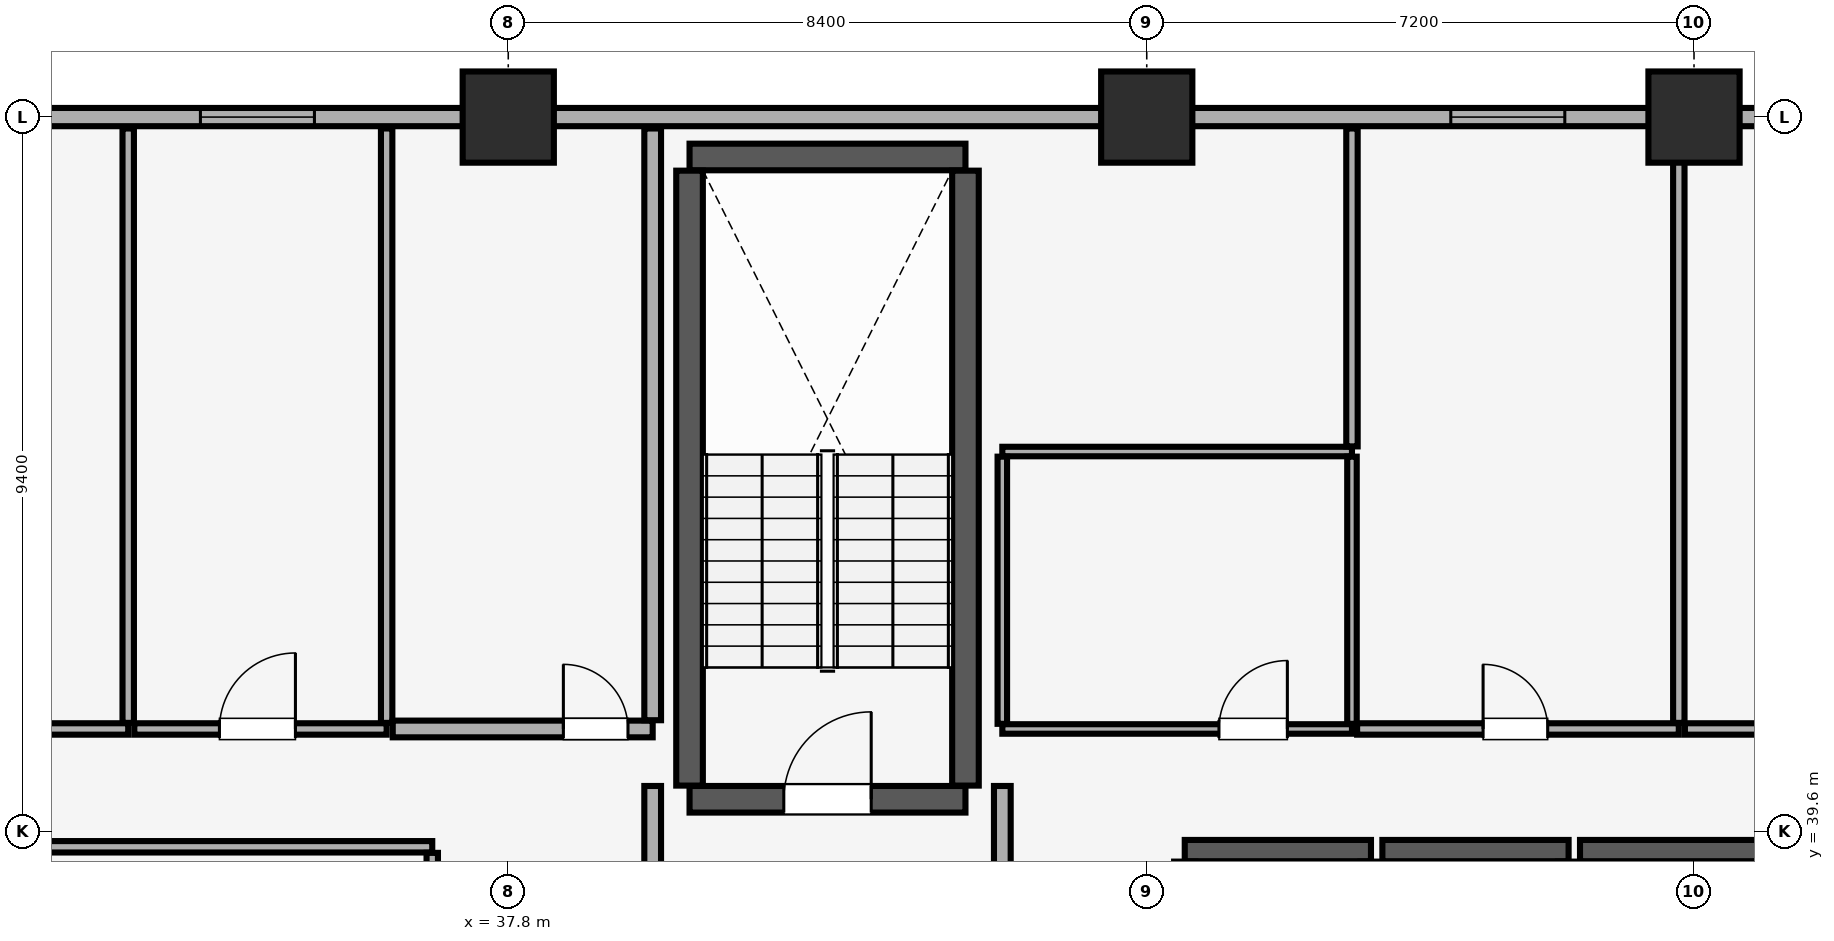
"""IFC4 building model, lengths in metres.
Left out: names, types, materials, properties, quantities, classifications, styles, units other than length and angle.
Written with IfcOpenShell. Run it as: python <this file> out.ifc"""

import sys

from ifc_helpers import new_model, si_unit, direction, frame, frame_2d, origin, origin_2d, place, context, subcontext, project, spatial, rectangle, extrude, element, fill, save


model = new_model("IFC4")
c1 = context("Model", 3, precision=1e-05, world=origin(), true_north=direction((0.0, 1.0)))
c2 = subcontext(c1, "Body", "Model", "MODEL_VIEW")
j1 = project(units=[si_unit("LENGTHUNIT", "METRE"), si_unit("PLANEANGLEUNIT", "RADIAN")], contexts=[c1])
p1 = place(None, origin())
s1 = spatial("IfcSite", under=j1, at=p1, CompositionType="ELEMENT")
p2 = place(p1, origin())
s2 = spatial("IfcBuilding", under=s1, at=p2, CompositionType="ELEMENT")
p3 = place(p2, frame((0.0, 0.0, 135.35)))
s3 = spatial("IfcBuildingStorey", under=s2, at=p3, CompositionType="ELEMENT", Elevation=135.35)
for number, where, z_axis, x_axis in (
    (1, (37.8, 49.0, 0.0), (0.0, 0.0, 1.0), (1.0, 0.0, 0.0)),
    (2, (46.2, 49.0, 0.0), (0.0, 0.0, 1.0), (1.0, 0.0, 0.0)),
    (3, (53.4, 49.0, 0.0), (0.0, 0.0, 1.0), (1.0, 0.0, 0.0)),
):
    element("IfcColumn", number, at=place(p3, frame(where, z_axis=z_axis, x_axis=x_axis)), inside=s3, PredefinedType="COLUMN", context=c2, shape_type="SweptSolid", body=[
        extrude(rectangle(XDim=1.2, YDim=1.2, at=origin_2d()), origin(), (0.0, 0.0, 1.0), 3.56),
    ])
p4 = place(p3, frame((77.0, 49.0, 0.0), z_axis=(0.0, 0.0, 1.0), x_axis=(-1.0, 0.0, 0.0)))
e4 = element("IfcWall", 4, at=p4, inside=s3, PredefinedType="SOLIDWALL", context=c2, shape_type="SweptSolid", body=[
    extrude(rectangle(XDim=70.0, YDim=0.24, at=frame_2d((35.0, 0.0))), origin(), (0.0, 0.0, 1.0), 2.61),
])
p5 = place(p4, frame((63.7, 0.0, 0.85)))
e5 = element("IfcOpeningElement", 5, at=p5, cuts=e4, PredefinedType="OPENING", context=c2, shape_type="SweptSolid", body=[
    extrude(rectangle(XDim=3.0, YDim=1.5, at=frame_2d((1.5, 0.75))), frame((0.0, 0.13, 0.0), z_axis=(0.0, -1.0, 0.0), x_axis=(1.0, 0.0, 0.0)), (0.0, 0.0, 1.0), 0.26),
])
p6 = place(p4, frame((3.3, 0.0, 0.85)))
e6 = element("IfcOpeningElement", 6, at=p6, cuts=e4, PredefinedType="OPENING", context=c2, shape_type="SweptSolid", body=[
    extrude(rectangle(XDim=3.0, YDim=1.5, at=frame_2d((1.5, 0.75))), frame((0.0, 0.13, 0.0), z_axis=(0.0, -1.0, 0.0), x_axis=(1.0, 0.0, 0.0)), (0.0, 0.0, 1.0), 0.26),
])
p7 = place(p4, frame((48.565, 0.0, 0.9)))
e7 = element("IfcOpeningElement", 7, at=p7, cuts=e4, PredefinedType="OPENING", context=c2, shape_type="SweptSolid", body=[
    extrude(rectangle(XDim=1.5, YDim=1.4, at=frame_2d((0.75, 0.7))), frame((0.0, 0.13, 0.0), z_axis=(0.0, -1.0, 0.0), x_axis=(1.0, 0.0, 0.0)), (0.0, 0.0, 1.0), 0.26),
])
p8 = place(p4, frame((41.75, 0.0, 0.9)))
e8 = element("IfcOpeningElement", 8, at=p8, cuts=e4, PredefinedType="OPENING", context=c2, shape_type="SweptSolid", body=[
    extrude(rectangle(XDim=1.5, YDim=1.4, at=frame_2d((0.75, 0.7))), frame((0.0, 0.13, 0.0), z_axis=(0.0, -1.0, 0.0), x_axis=(1.0, 0.0, 0.0)), (0.0, 0.0, 1.0), 0.26),
])
p9 = place(p4, frame((25.3, 0.0, 0.9)))
e9 = element("IfcOpeningElement", 9, at=p9, cuts=e4, PredefinedType="OPENING", context=c2, shape_type="SweptSolid", body=[
    extrude(rectangle(XDim=1.5, YDim=1.4, at=frame_2d((0.75, 0.7))), frame((0.0, 0.13, 0.0), z_axis=(0.0, -1.0, 0.0), x_axis=(1.0, 0.0, 0.0)), (0.0, 0.0, 1.0), 0.26),
])
p10 = place(p4, frame((20.685, 0.0, 0.9)))
e10 = element("IfcOpeningElement", 10, at=p10, cuts=e4, PredefinedType="OPENING", context=c2, shape_type="SweptSolid", body=[
    extrude(rectangle(XDim=1.5, YDim=1.4, at=frame_2d((0.75, 0.7))), frame((0.0, 0.13, 0.0), z_axis=(0.0, -1.0, 0.0), x_axis=(1.0, 0.0, 0.0)), (0.0, 0.0, 1.0), 0.26),
])
p11 = place(p3, frame((40.185, 40.025, 0.0), z_axis=(0.0, 0.0, 1.0), x_axis=(1.0, 0.0, 0.0)))
e11 = element("IfcWall", 11, at=p11, inside=s3, PredefinedType="SHEAR", context=c2, shape_type="SweptSolid", body=[
    extrude(rectangle(XDim=3.63, YDim=0.35, at=frame_2d((1.815, 0.0))), origin(), (0.0, 0.0, 1.0), 3.56),
])
p12 = place(p11, frame((1.24, 0.0, 0.0)))
e12 = element("IfcOpeningElement", 12, at=p12, cuts=e11, PredefinedType="OPENING", context=c2, shape_type="SweptSolid", body=[
    extrude(rectangle(XDim=1.15, YDim=2.15, at=frame_2d((0.575, 1.075))), frame((0.0, 0.185, 0.0), z_axis=(0.0, -1.0, 0.0), x_axis=(1.0, 0.0, 0.0)), (0.0, 0.0, 1.0), 0.37),
])
p13 = place(p3, frame((40.185, 48.475, 0.0), z_axis=(0.0, 0.0, 1.0), x_axis=(1.0, 0.0, 0.0)))
e13 = element("IfcWall", 13, at=p13, inside=s3, PredefinedType="SHEAR", context=c2, shape_type="SweptSolid", body=[
    extrude(rectangle(XDim=3.63, YDim=0.35, at=frame_2d((1.815, 0.0))), origin(), (0.0, 0.0, 1.0), 3.56),
])
for number, where, z_axis, x_axis in (
    (14, (40.185, 40.205, 0.0), (0.0, 0.0, 1.0), (0.0, 1.0, 0.0)),
    (15, (43.815, 40.205, 0.0), (0.0, 0.0, 1.0), (0.0, 1.0, 0.0)),
):
    element("IfcWall", number, at=place(p3, frame(where, z_axis=z_axis, x_axis=x_axis)), inside=s3, PredefinedType="SHEAR", context=c2, shape_type="SweptSolid", body=[
        extrude(rectangle(XDim=8.09, YDim=0.35, at=frame_2d((4.045, 0.0))), origin(), (0.0, 0.0, 1.0), 3.56),
    ])
p14 = place(p3, frame((46.7, 39.35, 0.0), z_axis=(0.0, 0.0, 1.0), x_axis=(1.0, 0.0, 0.0)))
e16 = element("IfcWall", 16, at=p14, inside=s3, PredefinedType="SHEAR", context=c2, shape_type="SweptSolid", body=[
    extrude(rectangle(XDim=2.45, YDim=0.28, at=frame_2d((1.225, 0.0))), origin(), (0.0, 0.0, 1.0), 3.56),
])
for number, where, z_axis, x_axis in (
    (17, (46.7, 37.145, 0.0), (0.0, 0.0, 1.0), (0.0, 1.0, 0.0)),
    (18, (49.15, 37.145, 0.0), (0.0, 0.0, 1.0), (0.0, 1.0, 0.0)),
):
    element("IfcWall", number, at=place(p3, frame(where, z_axis=z_axis, x_axis=x_axis)), inside=s3, PredefinedType="SHEAR", context=c2, shape_type="SweptSolid", body=[
        extrude(rectangle(XDim=2.06, YDim=0.28, at=frame_2d((1.03, 0.0))), origin(), (0.0, 0.0, 1.0), 3.56),
    ])
p15 = place(p3, frame((49.3, 39.35, 0.0), z_axis=(0.0, 0.0, 1.0), x_axis=(1.0, 0.0, 0.0)))
e19 = element("IfcWall", 19, at=p15, inside=s3, PredefinedType="SHEAR", context=c2, shape_type="SweptSolid", body=[
    extrude(rectangle(XDim=2.45, YDim=0.28, at=frame_2d((1.225, 0.0))), origin(), (0.0, 0.0, 1.0), 3.56),
])
p16 = place(p3, frame((51.75, 37.145, 0.0), z_axis=(0.0, 0.0, 1.0), x_axis=(0.0, 1.0, 0.0)))
e20 = element("IfcWall", 20, at=p16, inside=s3, PredefinedType="SHEAR", context=c2, shape_type="SweptSolid", body=[
    extrude(rectangle(XDim=2.06, YDim=0.28, at=frame_2d((1.03, 0.0))), origin(), (0.0, 0.0, 1.0), 3.56),
])
p17 = place(p3, frame((51.9, 39.35, 0.0), z_axis=(0.0, 0.0, 1.0), x_axis=(1.0, 0.0, 0.0)))
e21 = element("IfcWall", 21, at=p17, inside=s3, PredefinedType="SHEAR", context=c2, shape_type="SweptSolid", body=[
    extrude(rectangle(XDim=2.59, YDim=0.28, at=frame_2d((1.295, 0.0))), origin(), (0.0, 0.0, 1.0), 3.56),
])
for number, where, z_axis, x_axis in (
    (22, (39.7, 34.415, 0.0), (0.0, 0.0, 1.0), (0.0, 1.0, 0.0)),
    (23, (44.3, 34.415, 0.0), (0.0, 0.0, 1.0), (0.0, 1.0, 0.0)),
):
    element("IfcWall", number, at=place(p3, frame(where, z_axis=z_axis, x_axis=x_axis)), inside=s3, PredefinedType="PARTITIONING", context=c2, shape_type="SweptSolid", body=[
        extrude(rectangle(XDim=5.785, YDim=0.22, at=frame_2d((2.893, 0.0))), origin(), (0.0, 0.0, 1.0), 3.56),
    ])
p18 = place(p3, frame((31.6, 39.4, 0.0), z_axis=(0.0, 0.0, 1.0), x_axis=(1.0, 0.0, 0.0)))
e24 = element("IfcWall", 24, at=p18, inside=s3, PredefinedType="PARTITIONING", context=c2, shape_type="SweptSolid", body=[
    extrude(rectangle(XDim=5.2, YDim=0.15, at=frame_2d((2.6, 0.0))), origin(), (0.0, 0.0, 1.0), 3.56),
])
p19 = place(p3, frame((36.8, 34.38, 0.0), z_axis=(0.0, 0.0, 1.0), x_axis=(0.0, 1.0, 0.0)))
e25 = element("IfcWall", 25, at=p19, inside=s3, PredefinedType="PARTITIONING", context=c2, shape_type="SweptSolid", body=[
    extrude(rectangle(XDim=4.94, YDim=0.15, at=frame_2d((2.47, 0.0))), origin(), (0.0, 0.0, 1.0), 3.56),
])
p20 = place(p3, frame((25.0, 40.95, 0.0), z_axis=(0.0, 0.0, 1.0), x_axis=(1.0, 0.0, 0.0)))
e26 = element("IfcWall", 26, at=p20, inside=s3, PredefinedType="PARTITIONING", context=c2, shape_type="SweptSolid", body=[
    extrude(rectangle(XDim=7.8, YDim=0.15, at=frame_2d((3.9, 0.0))), origin(), (0.0, 0.0, 1.0), 3.56),
])
p21 = place(p20, frame((3.475, 0.0, 0.0)))
e27 = element("IfcOpeningElement", 27, at=p21, cuts=e26, PredefinedType="OPENING", context=c2, shape_type="SweptSolid", body=[
    extrude(rectangle(XDim=0.85, YDim=2.1, at=frame_2d((0.425, 1.05))), frame((0.0, 0.085, 0.0), z_axis=(0.0, -1.0, 0.0), x_axis=(1.0, 0.0, 0.0)), (0.0, 0.0, 1.0), 0.17),
])
p22 = place(p3, frame((32.8, 41.03, 0.0), z_axis=(0.0, 0.0, 1.0), x_axis=(0.0, 1.0, 0.0)))
e28 = element("IfcWall", 28, at=p22, inside=s3, PredefinedType="PARTITIONING", context=c2, shape_type="SweptSolid", body=[
    extrude(rectangle(XDim=7.82, YDim=0.15, at=frame_2d((3.91, 0.0))), origin(), (0.0, 0.0, 1.0), 3.56),
])
p23 = place(p3, frame((32.88, 40.95, 0.0), z_axis=(0.0, 0.0, 1.0), x_axis=(1.0, 0.0, 0.0)))
e29 = element("IfcWall", 29, at=p23, inside=s3, PredefinedType="PARTITIONING", context=c2, shape_type="SweptSolid", body=[
    extrude(rectangle(XDim=3.32, YDim=0.15, at=frame_2d((1.66, 0.0))), origin(), (0.0, 0.0, 1.0), 3.56),
])
p24 = place(p23, frame((1.12, 0.0, 0.0)))
e30 = element("IfcOpeningElement", 30, at=p24, cuts=e29, PredefinedType="OPENING", context=c2, shape_type="SweptSolid", body=[
    extrude(rectangle(XDim=1.0, YDim=2.15, at=frame_2d((0.5, 1.075))), frame((0.0, 0.085, 0.0), z_axis=(0.0, -1.0, 0.0), x_axis=(1.0, 0.0, 0.0)), (0.0, 0.0, 1.0), 0.17),
])
p25 = place(p3, frame((36.2, 41.03, 0.0), z_axis=(0.0, 0.0, 1.0), x_axis=(0.0, 1.0, 0.0)))
e31 = element("IfcWall", 31, at=p25, inside=s3, PredefinedType="PARTITIONING", context=c2, shape_type="SweptSolid", body=[
    extrude(rectangle(XDim=7.82, YDim=0.15, at=frame_2d((3.91, 0.0))), origin(), (0.0, 0.0, 1.0), 3.56),
])
p26 = place(p3, frame((36.28, 40.95, 0.0), z_axis=(0.0, 0.0, 1.0), x_axis=(1.0, 0.0, 0.0)))
e32 = element("IfcWall", 32, at=p26, inside=s3, PredefinedType="PARTITIONING", context=c2, shape_type="SweptSolid", body=[
    extrude(rectangle(XDim=3.42, YDim=0.22, at=frame_2d((1.71, 0.0))), origin(), (0.0, 0.0, 1.0), 3.56),
])
p27 = place(p26, frame((2.245, 0.0, 0.0)))
e33 = element("IfcOpeningElement", 33, at=p27, cuts=e32, PredefinedType="OPENING", context=c2, shape_type="SweptSolid", body=[
    extrude(rectangle(XDim=0.85, YDim=2.1, at=frame_2d((0.425, 1.05))), frame((0.0, 0.12, 0.0), z_axis=(0.0, -1.0, 0.0), x_axis=(1.0, 0.0, 0.0)), (0.0, 0.0, 1.0), 0.24),
])
p28 = place(p3, frame((39.7, 41.065, 0.0), z_axis=(0.0, 0.0, 1.0), x_axis=(0.0, 1.0, 0.0)))
e34 = element("IfcWall", 34, at=p28, inside=s3, PredefinedType="PARTITIONING", context=c2, shape_type="SweptSolid", body=[
    extrude(rectangle(XDim=7.785, YDim=0.22, at=frame_2d((3.893, 0.0))), origin(), (0.0, 0.0, 1.0), 3.56),
])
p29 = place(p3, frame((44.3, 40.95, 0.0), z_axis=(0.0, 0.0, 1.0), x_axis=(1.0, 0.0, 0.0)))
e35 = element("IfcWall", 35, at=p29, inside=s3, PredefinedType="PARTITIONING", context=c2, shape_type="SweptSolid", body=[
    extrude(rectangle(XDim=4.6, YDim=0.125, at=frame_2d((2.3, 0.0))), origin(), (0.0, 0.0, 1.0), 3.56),
])
p30 = place(p29, frame((2.85, 0.0, 0.0)))
e36 = element("IfcOpeningElement", 36, at=p30, cuts=e35, PredefinedType="OPENING", context=c2, shape_type="SweptSolid", body=[
    extrude(rectangle(XDim=0.9, YDim=2.1, at=frame_2d((0.45, 1.05))), frame((0.0, 0.073, 0.0), z_axis=(0.0, -1.0, 0.0), x_axis=(1.0, 0.0, 0.0)), (0.0, 0.0, 1.0), 0.145),
])
p31 = place(p3, frame((44.3, 44.6, 0.0), z_axis=(0.0, 0.0, 1.0), x_axis=(1.0, 0.0, 0.0)))
e37 = element("IfcWall", 37, at=p31, inside=s3, PredefinedType="PARTITIONING", context=c2, shape_type="SweptSolid", body=[
    extrude(rectangle(XDim=4.6, YDim=0.125, at=frame_2d((2.3, 0.0))), origin(), (0.0, 0.0, 1.0), 3.56),
])
for number, where, z_axis, x_axis in (
    (38, (44.3, 41.018, 0.0), (0.0, 0.0, 1.0), (0.0, 1.0, 0.0)),
    (39, (48.9, 41.018, 0.0), (0.0, 0.0, 1.0), (0.0, 1.0, 0.0)),
):
    element("IfcWall", number, at=place(p3, frame(where, z_axis=z_axis, x_axis=x_axis)), inside=s3, PredefinedType="PARTITIONING", context=c2, shape_type="SweptSolid", body=[
        extrude(rectangle(XDim=3.515, YDim=0.125, at=frame_2d((1.757, 0.0))), origin(), (0.0, 0.0, 1.0), 3.56),
    ])
p32 = place(p3, frame((48.968, 40.95, 0.0), z_axis=(0.0, 0.0, 1.0), x_axis=(1.0, 0.0, 0.0)))
e40 = element("IfcWall", 40, at=p32, inside=s3, PredefinedType="PARTITIONING", context=c2, shape_type="SweptSolid", body=[
    extrude(rectangle(XDim=4.232, YDim=0.15, at=frame_2d((2.116, 0.0))), origin(), (0.0, 0.0, 1.0), 3.56),
])
p33 = place(p32, frame((1.657, 0.0, 0.0)))
e41 = element("IfcOpeningElement", 41, at=p33, cuts=e40, PredefinedType="OPENING", context=c2, shape_type="SweptSolid", body=[
    extrude(rectangle(XDim=0.85, YDim=2.1, at=frame_2d((0.425, 1.05))), frame((0.0, 0.085, 0.0), z_axis=(0.0, -1.0, 0.0), x_axis=(1.0, 0.0, 0.0)), (0.0, 0.0, 1.0), 0.17),
])
p34 = place(p3, frame((48.9, 44.667, 0.0), z_axis=(0.0, 0.0, 1.0), x_axis=(0.0, 1.0, 0.0)))
e42 = element("IfcWall", 42, at=p34, inside=s3, PredefinedType="PARTITIONING", context=c2, shape_type="SweptSolid", body=[
    extrude(rectangle(XDim=4.183, YDim=0.15, at=frame_2d((2.091, 0.0))), origin(), (0.0, 0.0, 1.0), 3.56),
])
p35 = place(p3, frame((53.2, 41.03, 0.0), z_axis=(0.0, 0.0, 1.0), x_axis=(0.0, 1.0, 0.0)))
e43 = element("IfcWall", 43, at=p35, inside=s3, PredefinedType="PARTITIONING", context=c2, shape_type="SweptSolid", body=[
    extrude(rectangle(XDim=7.82, YDim=0.15, at=frame_2d((3.91, 0.0))), origin(), (0.0, 0.0, 1.0), 3.56),
])
p36 = place(p3, frame((53.28, 40.95, 0.0), z_axis=(0.0, 0.0, 1.0), x_axis=(1.0, 0.0, 0.0)))
e44 = element("IfcWall", 44, at=p36, inside=s3, PredefinedType="PARTITIONING", context=c2, shape_type="SweptSolid", body=[
    extrude(rectangle(XDim=4.22, YDim=0.15, at=frame_2d((2.11, 0.0))), origin(), (0.0, 0.0, 1.0), 3.56),
])
p37 = place(p36, frame((1.645, 0.0, 0.0)))
e45 = element("IfcOpeningElement", 45, at=p37, cuts=e44, PredefinedType="OPENING", context=c2, shape_type="SweptSolid", body=[
    extrude(rectangle(XDim=0.85, YDim=2.1, at=frame_2d((0.425, 1.05))), frame((0.0, 0.085, 0.0), z_axis=(0.0, -1.0, 0.0), x_axis=(1.0, 0.0, 0.0)), (0.0, 0.0, 1.0), 0.17),
])
p38 = place(p8, origin())
e46 = element("IfcWindow", 46, at=p38, inside=s3, PartitioningType="SINGLE_PANEL", PredefinedType="WINDOW", context=c2, shape_type="SweptSolid", body=[
    extrude(rectangle(XDim=1.5, YDim=1.4, at=frame_2d((0.75, 0.7))), frame((0.0, 0.03, 0.0), z_axis=(0.0, -1.0, 0.0), x_axis=(1.0, 0.0, 0.0)), (0.0, 0.0, 1.0), 0.06),
])
fill(e8, e46)
p39 = place(p9, origin())
e47 = element("IfcWindow", 47, at=p39, inside=s3, PartitioningType="SINGLE_PANEL", PredefinedType="WINDOW", context=c2, shape_type="SweptSolid", body=[
    extrude(rectangle(XDim=1.5, YDim=1.4, at=frame_2d((0.75, 0.7))), frame((0.0, 0.03, 0.0), z_axis=(0.0, -1.0, 0.0), x_axis=(1.0, 0.0, 0.0)), (0.0, 0.0, 1.0), 0.06),
])
fill(e9, e47)
p40 = place(p12, origin())
e48 = element("IfcDoor", 48, at=p40, inside=s3, OperationType="SINGLE_SWING_RIGHT", PredefinedType="DOOR", context=c2, shape_type="SweptSolid", body=[
    extrude(rectangle(XDim=1.15, YDim=2.15, at=frame_2d((0.575, 1.075))), frame((0.0, 0.025, 0.0), z_axis=(0.0, -1.0, 0.0), x_axis=(1.0, 0.0, 0.0)), (0.0, 0.0, 1.0), 0.05),
])
fill(e12, e48)
p41 = place(p24, origin())
e49 = element("IfcDoor", 49, at=p41, inside=s3, OperationType="SINGLE_SWING_RIGHT", PredefinedType="DOOR", context=c2, shape_type="SweptSolid", body=[
    extrude(rectangle(XDim=1.0, YDim=2.15, at=frame_2d((0.5, 1.075))), frame((0.0, 0.025, 0.0), z_axis=(0.0, -1.0, 0.0), x_axis=(1.0, 0.0, 0.0)), (0.0, 0.0, 1.0), 0.05),
])
fill(e30, e49)
p42 = place(p27, origin())
e50 = element("IfcDoor", 50, at=p42, inside=s3, OperationType="SINGLE_SWING_LEFT", PredefinedType="DOOR", context=c2, shape_type="SweptSolid", body=[
    extrude(rectangle(XDim=0.85, YDim=2.1, at=frame_2d((0.425, 1.05))), frame((0.0, 0.025, 0.0), z_axis=(0.0, -1.0, 0.0), x_axis=(1.0, 0.0, 0.0)), (0.0, 0.0, 1.0), 0.05),
])
fill(e33, e50)
p43 = place(p30, origin())
e51 = element("IfcDoor", 51, at=p43, inside=s3, OperationType="SINGLE_SWING_RIGHT", PredefinedType="DOOR", context=c2, shape_type="SweptSolid", body=[
    extrude(rectangle(XDim=0.9, YDim=2.1, at=frame_2d((0.45, 1.05))), frame((0.0, 0.025, 0.0), z_axis=(0.0, -1.0, 0.0), x_axis=(1.0, 0.0, 0.0)), (0.0, 0.0, 1.0), 0.05),
])
fill(e36, e51)
p44 = place(p33, origin())
e52 = element("IfcDoor", 52, at=p44, inside=s3, OperationType="SINGLE_SWING_LEFT", PredefinedType="DOOR", context=c2, shape_type="SweptSolid", body=[
    extrude(rectangle(XDim=0.85, YDim=2.1, at=frame_2d((0.425, 1.05))), frame((0.0, 0.025, 0.0), z_axis=(0.0, -1.0, 0.0), x_axis=(1.0, 0.0, 0.0)), (0.0, 0.0, 1.0), 0.05),
])
fill(e41, e52)
save(model, sys.argv[1])
